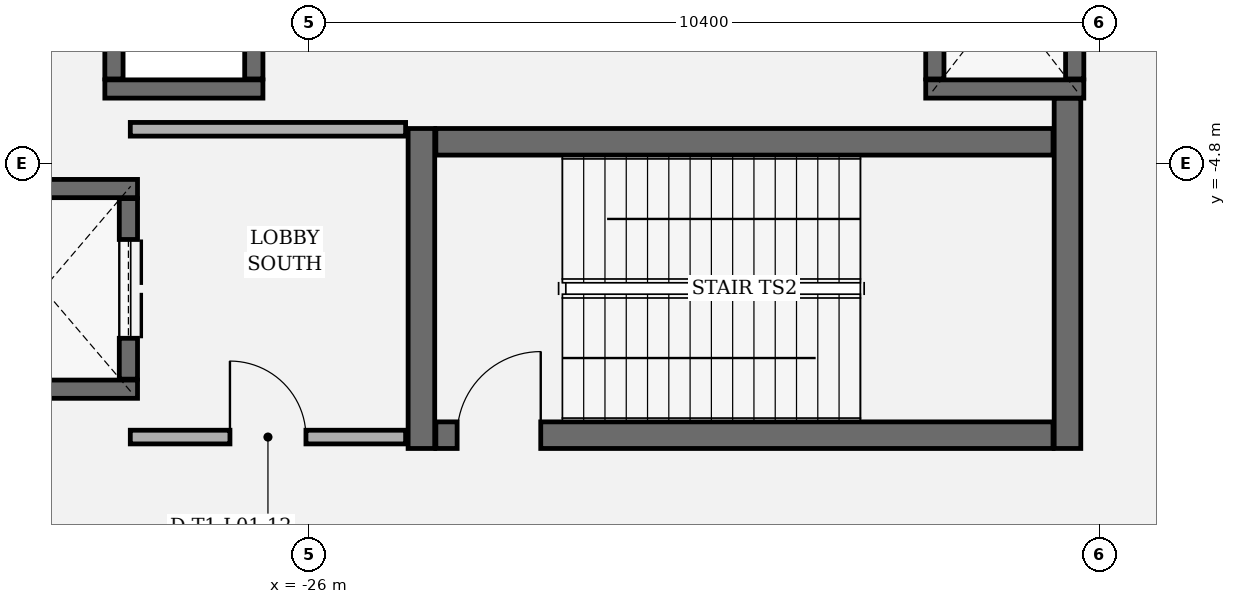
"""IFC4 building model, lengths in metres.
Left out: names, types, materials, properties, quantities, classifications, styles, units other than length and angle.
Written with IfcOpenShell. Run it as: python <this file> out.ifc"""

import sys

from ifc_helpers import new_model, si_unit, direction, frame, frame_2d, origin, place, context, subcontext, project, spatial, rectangle, extrude, element, fill, save


model = new_model("IFC4")
c1 = context("Model", 3, precision=1e-05, world=origin(), true_north=direction((0.0, 1.0)))
c2 = subcontext(c1, "Body", "Model", "MODEL_VIEW")
j1 = project(units=[si_unit("LENGTHUNIT", "METRE"), si_unit("PLANEANGLEUNIT", "RADIAN")], contexts=[c1])
p1 = place(None, origin())
s1 = spatial("IfcSite", under=j1, at=p1, CompositionType="ELEMENT")
p2 = place(p1, origin())
s2 = spatial("IfcBuilding", under=s1, at=p2, CompositionType="ELEMENT")
p3 = place(p2, frame((0.0, 0.0, 6.6)))
s3 = spatial("IfcBuildingStorey", under=s2, at=p3, CompositionType="ELEMENT", Elevation=6.6)
p4 = place(p3, frame((-13.635, -37.094, 0.0), z_axis=(0.0, 0.0, 1.0), x_axis=(-0.842602364841, 0.538536214905, 0.0)))
e1 = element("IfcWall", 1, at=p4, inside=s3, PredefinedType="SOLIDWALL", context=c2, shape_type="SweptSolid", body=[
    extrude(rectangle(XDim=60.27, YDim=0.38, at=frame_2d((30.135, 0.0))), origin(), (0.0, 0.0, 1.0), 5.14),
])
p5 = place(p4, frame((29.435, 0.0, 0.8)))
e2 = element("IfcOpeningElement", 2, at=p5, cuts=e1, PredefinedType="OPENING", context=c2, shape_type="SweptSolid", body=[
    extrude(rectangle(XDim=1.4, YDim=1.5, at=frame_2d((0.7, 0.75))), frame((0.0, 0.2, 0.0), z_axis=(0.0, -1.0, 0.0), x_axis=(1.0, 0.0, 0.0)), (0.0, 0.0, 1.0), 0.4),
])
p6 = place(p3, frame((-24.525, -4.34, 0.0), z_axis=(0.0, 0.0, 1.0), x_axis=(0.0, -1.0, 0.0)))
e3 = element("IfcWall", 3, at=p6, inside=s3, PredefinedType="SHEAR", context=c2, shape_type="SweptSolid", body=[
    extrude(rectangle(XDim=4.21, YDim=0.35, at=frame_2d((2.105, 0.0))), origin(), (0.0, 0.0, 1.0), 5.14),
])
p7 = place(p3, frame((-16.025, -8.55, 0.0), z_axis=(0.0, 0.0, 1.0), x_axis=(0.0, 1.0, 0.0)))
e4 = element("IfcWall", 4, at=p7, inside=s3, PredefinedType="SHEAR", context=c2, shape_type="SweptSolid", body=[
    extrude(rectangle(XDim=4.61, YDim=0.35, at=frame_2d((2.305, 0.0))), origin(), (0.0, 0.0, 1.0), 5.14),
])
p8 = place(p3, frame((-24.335, -8.375, 0.0), z_axis=(0.0, 0.0, 1.0), x_axis=(1.0, 0.0, 0.0)))
e5 = element("IfcWall", 5, at=p8, inside=s3, PredefinedType="SHEAR", context=c2, shape_type="SweptSolid", body=[
    extrude(rectangle(XDim=8.12, YDim=0.35, at=frame_2d((4.06, 0.0))), origin(), (0.0, 0.0, 1.0), 5.14),
])
p9 = place(p8, frame((0.28, 0.0, 0.0)))
e6 = element("IfcOpeningElement", 6, at=p9, cuts=e5, PredefinedType="OPENING", context=c2, shape_type="SweptSolid", body=[
    extrude(rectangle(XDim=1.1, YDim=2.2, at=frame_2d((0.55, 1.1))), frame((0.0, 0.185, 0.0), z_axis=(0.0, -1.0, 0.0), x_axis=(1.0, 0.0, 0.0)), (0.0, 0.0, 1.0), 0.37),
])
p10 = place(p3, frame((-16.215, -4.515, 0.0), z_axis=(0.0, 0.0, 1.0), x_axis=(-1.0, 0.0, 0.0)))
e7 = element("IfcWall", 7, at=p10, inside=s3, PredefinedType="SHEAR", context=c2, shape_type="SweptSolid", body=[
    extrude(rectangle(XDim=8.12, YDim=0.35, at=frame_2d((4.06, 0.0))), origin(), (0.0, 0.0, 1.0), 5.14),
])
for number, where, z_axis, x_axis in (
    (8, (-28.26, -7.77, 0.0), (0.0, 0.0, 1.0), (-1.0, 0.0, 0.0)),
    (9, (-30.74, -5.13, 0.0), (0.0, 0.0, 1.0), (1.0, 0.0, 0.0)),
):
    element("IfcWall", number, at=place(p3, frame(where, z_axis=z_axis, x_axis=x_axis)), inside=s3, PredefinedType="SHEAR", context=c2, shape_type="SweptSolid", body=[
        extrude(rectangle(XDim=2.48, YDim=0.24, at=frame_2d((1.24, 0.0))), origin(), (0.0, 0.0, 1.0), 5.14),
    ])
p11 = place(p3, frame((-28.38, -5.262, 0.0), z_axis=(0.0, 0.0, 1.0), x_axis=(0.0, -1.0, 0.0)))
e10 = element("IfcWall", 10, at=p11, inside=s3, PredefinedType="SHEAR", context=c2, shape_type="SweptSolid", body=[
    extrude(rectangle(XDim=2.376, YDim=0.24, at=frame_2d((1.188, 0.0))), origin(), (0.0, 0.0, 1.0), 5.14),
])
p12 = place(p11, frame((0.538, 0.0, 0.0)))
e11 = element("IfcOpeningElement", 11, at=p12, cuts=e10, PredefinedType="OPENING", context=c2, shape_type="SweptSolid", body=[
    extrude(rectangle(XDim=1.3, YDim=2.3, at=frame_2d((0.65, 1.15))), frame((0.0, 0.13, 0.0), z_axis=(0.0, -1.0, 0.0), x_axis=(1.0, 0.0, 0.0)), (0.0, 0.0, 1.0), 0.26),
])
p13 = place(p3, frame((-26.61, -3.82, 0.0), z_axis=(0.0, 0.0, 1.0), x_axis=(-1.0, 0.0, 0.0)))
e12 = element("IfcWall", 12, at=p13, inside=s3, PredefinedType="SHEAR", context=c2, shape_type="SweptSolid", body=[
    extrude(rectangle(XDim=2.08, YDim=0.24, at=frame_2d((1.04, 0.0))), origin(), (0.0, 0.0, 1.0), 5.14),
])
for number, where, z_axis, x_axis in (
    (13, (-28.57, -3.688, 0.0), (0.0, 0.0, 1.0), (0.0, 1.0, 0.0)),
    (14, (-26.73, -1.562, 0.0), (0.0, 0.0, 1.0), (0.0, -1.0, 0.0)),
):
    element("IfcWall", number, at=place(p3, frame(where, z_axis=z_axis, x_axis=x_axis)), inside=s3, PredefinedType="SHEAR", context=c2, shape_type="SweptSolid", body=[
        extrude(rectangle(XDim=2.126, YDim=0.24, at=frame_2d((1.063, 0.0))), origin(), (0.0, 0.0, 1.0), 5.14),
    ])
p14 = place(p3, frame((-15.81, -3.82, 0.0), z_axis=(0.0, 0.0, 1.0), x_axis=(-1.0, 0.0, 0.0)))
e15 = element("IfcWall", 15, at=p14, inside=s3, PredefinedType="SHEAR", context=c2, shape_type="SweptSolid", body=[
    extrude(rectangle(XDim=2.08, YDim=0.24, at=frame_2d((1.04, 0.0))), origin(), (0.0, 0.0, 1.0), 5.14),
])
for number, where, z_axis, x_axis in (
    (16, (-17.77, -3.688, 0.0), (0.0, 0.0, 1.0), (0.0, 1.0, 0.0)),
    (17, (-15.93, -1.562, 0.0), (0.0, 0.0, 1.0), (0.0, -1.0, 0.0)),
):
    element("IfcWall", number, at=place(p3, frame(where, z_axis=z_axis, x_axis=x_axis)), inside=s3, PredefinedType="SHEAR", context=c2, shape_type="SweptSolid", body=[
        extrude(rectangle(XDim=2.126, YDim=0.24, at=frame_2d((1.063, 0.0))), origin(), (0.0, 0.0, 1.0), 5.14),
    ])
p15 = place(p3, frame((-28.355, -8.4, 0.0), z_axis=(0.0, 0.0, 1.0), x_axis=(1.0, 0.0, 0.0)))
e18 = element("IfcWall", 18, at=p15, inside=s3, PredefinedType="PARTITIONING", context=c2, shape_type="SweptSolid", body=[
    extrude(rectangle(XDim=3.622, YDim=0.18, at=frame_2d((1.811, 0.0))), origin(), (0.0, 0.0, 1.0), 5.14),
])
p16 = place(p15, frame((1.311, 0.0, 0.0)))
e19 = element("IfcOpeningElement", 19, at=p16, cuts=e18, PredefinedType="OPENING", context=c2, shape_type="SweptSolid", body=[
    extrude(rectangle(XDim=1.0, YDim=2.15, at=frame_2d((0.5, 1.075))), frame((0.0, 0.1, 0.0), z_axis=(0.0, -1.0, 0.0), x_axis=(1.0, 0.0, 0.0)), (0.0, 0.0, 1.0), 0.2),
])
p17 = place(p3, frame((-24.733, -4.35, 0.0), z_axis=(0.0, 0.0, 1.0), x_axis=(-1.0, 0.0, 0.0)))
e20 = element("IfcWall", 20, at=p17, inside=s3, PredefinedType="PARTITIONING", context=c2, shape_type="SweptSolid", body=[
    extrude(rectangle(XDim=3.622, YDim=0.18, at=frame_2d((1.811, 0.0))), origin(), (0.0, 0.0, 1.0), 5.14),
])
p18 = place(p9, origin())
e21 = element("IfcDoor", 21, at=p18, inside=s3, OperationType="SINGLE_SWING_RIGHT", PredefinedType="DOOR", context=c2, shape_type="SweptSolid", body=[
    extrude(rectangle(XDim=1.1, YDim=2.2, at=frame_2d((0.55, 1.1))), frame((0.0, 0.025, 0.0), z_axis=(0.0, -1.0, 0.0), x_axis=(1.0, 0.0, 0.0)), (0.0, 0.0, 1.0), 0.05),
])
fill(e6, e21)
p19 = place(p12, origin())
e22 = element("IfcDoor", 22, at=p19, inside=s3, OperationType="DOUBLE_DOOR_SLIDING", PredefinedType="DOOR", context=c2, shape_type="SweptSolid", body=[
    extrude(rectangle(XDim=1.3, YDim=2.3, at=frame_2d((0.65, 1.15))), frame((0.0, 0.025, 0.0), z_axis=(0.0, -1.0, 0.0), x_axis=(1.0, 0.0, 0.0)), (0.0, 0.0, 1.0), 0.05),
])
fill(e11, e22)
p20 = place(p16, origin())
e23 = element("IfcDoor", 23, at=p20, inside=s3, OperationType="SINGLE_SWING_LEFT", PredefinedType="DOOR", context=c2, shape_type="SweptSolid", body=[
    extrude(rectangle(XDim=1.0, YDim=2.15, at=frame_2d((0.5, 1.075))), frame((0.0, 0.025, 0.0), z_axis=(0.0, -1.0, 0.0), x_axis=(1.0, 0.0, 0.0)), (0.0, 0.0, 1.0), 0.05),
])
fill(e19, e23)
save(model, sys.argv[1])
